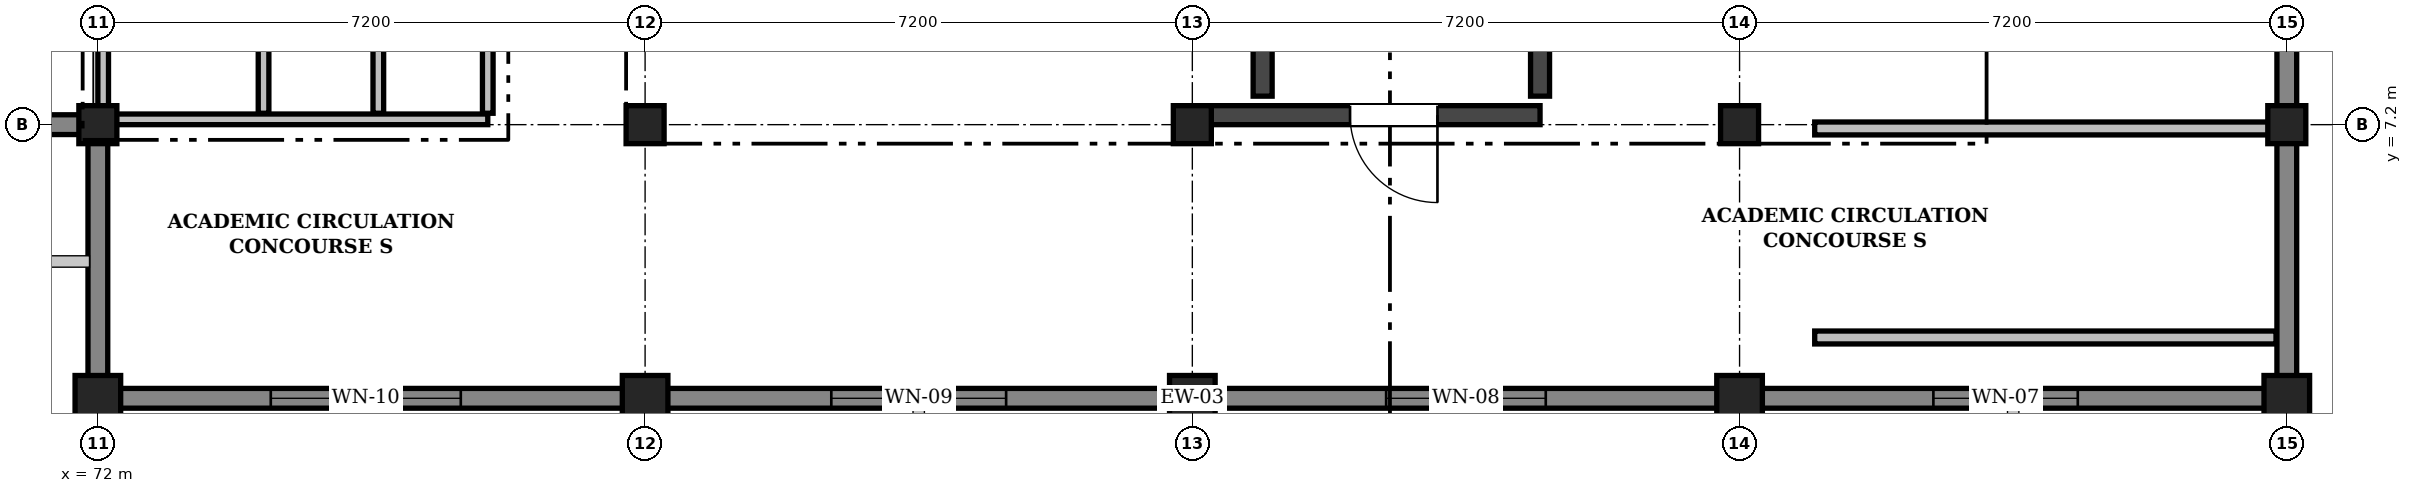
"""IFC4 building model, lengths in metres.
Left out: names, types, materials, properties, quantities, classifications, styles, units other than length and angle.
Written with IfcOpenShell. Run it as: python <this file> out.ifc"""

import sys

from ifc_helpers import new_model, si_unit, direction, frame, frame_2d, origin, origin_2d, place, context, subcontext, project, spatial, rectangle, extrude, element, fill, save


model = new_model("IFC4")
c1 = context("Model", 3, precision=1e-05, world=origin(), true_north=direction((0.0, 1.0)))
c2 = subcontext(c1, "Body", "Model", "MODEL_VIEW")
j1 = project(units=[si_unit("LENGTHUNIT", "METRE"), si_unit("PLANEANGLEUNIT", "RADIAN")], contexts=[c1])
p1 = place(None, origin())
s1 = spatial("IfcSite", under=j1, at=p1, CompositionType="ELEMENT")
p2 = place(p1, origin())
s2 = spatial("IfcBuilding", under=s1, at=p2, CompositionType="ELEMENT")
p3 = place(p2, frame((0.0, 0.0, 32.4)))
s3 = spatial("IfcBuildingStorey", under=s2, at=p3, CompositionType="ELEMENT", Elevation=32.4)
p4 = place(p3, frame((72.0, 3.6, 0.0), z_axis=(0.0, 0.0, 1.0), x_axis=(1.0, 0.0, 0.0)))
e1 = element("IfcColumn", 1, at=p4, inside=s3, PredefinedType="COLUMN", context=c2, shape_type="SweptSolid", body=[
    extrude(rectangle(XDim=0.6, YDim=0.6, at=origin_2d()), origin(), (0.0, 0.0, 1.0), 4.5),
])
p5 = place(p3, frame((72.0, 7.2, 0.0), z_axis=(0.0, 0.0, 1.0), x_axis=(1.0, 0.0, 0.0)))
e2 = element("IfcColumn", 2, at=p5, inside=s3, PredefinedType="COLUMN", context=c2, shape_type="SweptSolid", body=[
    extrude(rectangle(XDim=0.5, YDim=0.5, at=origin_2d()), origin(), (0.0, 0.0, 1.0), 4.5),
])
p6 = place(p3, frame((79.2, 3.6, 0.0), z_axis=(0.0, 0.0, 1.0), x_axis=(1.0, 0.0, 0.0)))
e3 = element("IfcColumn", 3, at=p6, inside=s3, PredefinedType="COLUMN", context=c2, shape_type="SweptSolid", body=[
    extrude(rectangle(XDim=0.6, YDim=0.6, at=origin_2d()), origin(), (0.0, 0.0, 1.0), 4.5),
])
p7 = place(p3, frame((79.2, 7.2, 0.0), z_axis=(0.0, 0.0, 1.0), x_axis=(1.0, 0.0, 0.0)))
e4 = element("IfcColumn", 4, at=p7, inside=s3, PredefinedType="COLUMN", context=c2, shape_type="SweptSolid", body=[
    extrude(rectangle(XDim=0.5, YDim=0.5, at=origin_2d()), origin(), (0.0, 0.0, 1.0), 4.5),
])
p8 = place(p3, frame((86.4, 3.6, 0.0), z_axis=(0.0, 0.0, 1.0), x_axis=(1.0, 0.0, 0.0)))
e5 = element("IfcColumn", 5, at=p8, inside=s3, PredefinedType="COLUMN", context=c2, shape_type="SweptSolid", body=[
    extrude(rectangle(XDim=0.6, YDim=0.6, at=origin_2d()), origin(), (0.0, 0.0, 1.0), 4.5),
])
p9 = place(p3, frame((86.4, 7.2, 0.0), z_axis=(0.0, 0.0, 1.0), x_axis=(1.0, 0.0, 0.0)))
e6 = element("IfcColumn", 6, at=p9, inside=s3, PredefinedType="COLUMN", context=c2, shape_type="SweptSolid", body=[
    extrude(rectangle(XDim=0.5, YDim=0.5, at=origin_2d()), origin(), (0.0, 0.0, 1.0), 4.5),
])
p10 = place(p3, frame((93.6, 3.6, 0.0), z_axis=(0.0, 0.0, 1.0), x_axis=(1.0, 0.0, 0.0)))
e7 = element("IfcColumn", 7, at=p10, inside=s3, PredefinedType="COLUMN", context=c2, shape_type="SweptSolid", body=[
    extrude(rectangle(XDim=0.6, YDim=0.6, at=origin_2d()), origin(), (0.0, 0.0, 1.0), 4.5),
])
p11 = place(p3, frame((93.6, 7.2, 0.0), z_axis=(0.0, 0.0, 1.0), x_axis=(1.0, 0.0, 0.0)))
e8 = element("IfcColumn", 8, at=p11, inside=s3, PredefinedType="COLUMN", context=c2, shape_type="SweptSolid", body=[
    extrude(rectangle(XDim=0.5, YDim=0.5, at=origin_2d()), origin(), (0.0, 0.0, 1.0), 4.5),
])
p12 = place(p3, frame((100.8, 3.6, 0.0), z_axis=(0.0, 0.0, 1.0), x_axis=(1.0, 0.0, 0.0)))
e9 = element("IfcColumn", 9, at=p12, inside=s3, PredefinedType="COLUMN", context=c2, shape_type="SweptSolid", body=[
    extrude(rectangle(XDim=0.6, YDim=0.6, at=origin_2d()), origin(), (0.0, 0.0, 1.0), 4.5),
])
p13 = place(p3, frame((100.8, 7.2, 0.0), z_axis=(0.0, 0.0, 1.0), x_axis=(1.0, 0.0, 0.0)))
e10 = element("IfcColumn", 10, at=p13, inside=s3, PredefinedType="COLUMN", context=c2, shape_type="SweptSolid", body=[
    extrude(rectangle(XDim=0.5, YDim=0.5, at=origin_2d()), origin(), (0.0, 0.0, 1.0), 4.5),
])
p14 = place(p3, frame((100.95, 3.6, 0.0), z_axis=(0.0, 0.0, 1.0), x_axis=(-1.0, 0.0, 0.0)))
e11 = element("IfcWall", 11, at=p14, inside=s3, PredefinedType="SOLIDWALL", context=c2, shape_type="SweptSolid", body=[
    extrude(rectangle(XDim=7.35, YDim=0.26, at=frame_2d((3.675, 0.0))), origin(), (0.0, 0.0, 1.0), 4.22),
])
p15 = place(p14, frame((2.9, 0.0, 0.95)))
e12 = element("IfcOpeningElement", 12, at=p15, cuts=e11, PredefinedType="OPENING", context=c2, shape_type="SweptSolid", body=[
    extrude(rectangle(XDim=1.9, YDim=1.3, at=frame_2d((0.95, 0.65))), frame((0.0, 0.142, 0.0), z_axis=(0.0, -1.0, 0.0), x_axis=(1.0, 0.0, 0.0)), (0.0, 0.0, 1.0), 0.284),
])
p16 = place(p3, frame((93.6, 3.6, 0.0), z_axis=(0.0, 0.0, 1.0), x_axis=(-1.0, 0.0, 0.0)))
e13 = element("IfcWall", 13, at=p16, inside=s3, PredefinedType="SOLIDWALL", context=c2, shape_type="SweptSolid", body=[
    extrude(rectangle(XDim=7.2, YDim=0.26, at=frame_2d((3.6, 0.0))), origin(), (0.0, 0.0, 1.0), 4.22),
])
p17 = place(p16, frame((2.55, 0.0, 0.95)))
e14 = element("IfcOpeningElement", 14, at=p17, cuts=e13, PredefinedType="OPENING", context=c2, shape_type="SweptSolid", body=[
    extrude(rectangle(XDim=2.1, YDim=1.3, at=frame_2d((1.05, 0.65))), frame((0.0, 0.142, 0.0), z_axis=(0.0, -1.0, 0.0), x_axis=(1.0, 0.0, 0.0)), (0.0, 0.0, 1.0), 0.284),
])
p18 = place(p3, frame((86.4, 3.6, 0.0), z_axis=(0.0, 0.0, 1.0), x_axis=(-1.0, 0.0, 0.0)))
e15 = element("IfcWall", 15, at=p18, inside=s3, PredefinedType="SOLIDWALL", context=c2, shape_type="SweptSolid", body=[
    extrude(rectangle(XDim=7.2, YDim=0.26, at=frame_2d((3.6, 0.0))), origin(), (0.0, 0.0, 1.0), 4.22),
])
p19 = place(p18, frame((2.45, 0.0, 0.95)))
e16 = element("IfcOpeningElement", 16, at=p19, cuts=e15, PredefinedType="OPENING", context=c2, shape_type="SweptSolid", body=[
    extrude(rectangle(XDim=2.3, YDim=1.3, at=frame_2d((1.15, 0.65))), frame((0.0, 0.142, 0.0), z_axis=(0.0, -1.0, 0.0), x_axis=(1.0, 0.0, 0.0)), (0.0, 0.0, 1.0), 0.284),
])
p20 = place(p3, frame((79.2, 3.6, 0.0), z_axis=(0.0, 0.0, 1.0), x_axis=(-1.0, 0.0, 0.0)))
e17 = element("IfcWall", 17, at=p20, inside=s3, PredefinedType="SOLIDWALL", context=c2, shape_type="SweptSolid", body=[
    extrude(rectangle(XDim=7.35, YDim=0.26, at=frame_2d((3.675, 0.0))), origin(), (0.0, 0.0, 1.0), 4.22),
])
p21 = place(p20, frame((2.425, 0.0, 0.95)))
e18 = element("IfcOpeningElement", 18, at=p21, cuts=e17, PredefinedType="OPENING", context=c2, shape_type="SweptSolid", body=[
    extrude(rectangle(XDim=2.5, YDim=1.3, at=frame_2d((1.25, 0.65))), frame((0.0, 0.142, 0.0), z_axis=(0.0, -1.0, 0.0), x_axis=(1.0, 0.0, 0.0)), (0.0, 0.0, 1.0), 0.284),
])
p22 = place(p3, frame((72.0, 3.752, 0.0), z_axis=(0.0, 0.0, 1.0), x_axis=(0.0, 1.0, 0.0)))
e19 = element("IfcWall", 19, at=p22, inside=s3, PredefinedType="SOLIDWALL", context=c2, shape_type="SweptSolid", body=[
    extrude(rectangle(XDim=3.296, YDim=0.26, at=frame_2d((1.648, 0.0))), origin(), (0.0, 0.0, 1.0), 4.22),
])
p23 = place(p3, frame((72.15, 7.2, 0.0), z_axis=(0.0, 0.0, 1.0), x_axis=(-1.0, 0.0, 0.0)))
e20 = element("IfcWall", 20, at=p23, inside=s3, PredefinedType="SOLIDWALL", context=c2, shape_type="SweptSolid", body=[
    extrude(rectangle(XDim=7.35, YDim=0.26, at=frame_2d((3.675, 0.0))), origin(), (0.0, 0.0, 1.0), 4.22),
])
p24 = place(p23, frame((2.325, 0.0, 0.95)))
e21 = element("IfcOpeningElement", 21, at=p24, cuts=e20, PredefinedType="OPENING", context=c2, shape_type="SweptSolid", body=[
    extrude(rectangle(XDim=2.7, YDim=1.3, at=frame_2d((1.35, 0.65))), frame((0.0, 0.142, 0.0), z_axis=(0.0, -1.0, 0.0), x_axis=(1.0, 0.0, 0.0)), (0.0, 0.0, 1.0), 0.284),
])
p25 = place(p3, frame((100.8, 14.4, 0.0), z_axis=(0.0, 0.0, 1.0), x_axis=(0.0, -1.0, 0.0)))
e22 = element("IfcWall", 22, at=p25, inside=s3, PredefinedType="SOLIDWALL", context=c2, shape_type="SweptSolid", body=[
    extrude(rectangle(XDim=7.2, YDim=0.26, at=frame_2d((3.6, 0.0))), origin(), (0.0, 0.0, 1.0), 4.22),
])
p26 = place(p25, frame((2.875, 0.0, 0.95)))
e23 = element("IfcOpeningElement", 23, at=p26, cuts=e22, PredefinedType="OPENING", context=c2, shape_type="SweptSolid", body=[
    extrude(rectangle(XDim=1.45, YDim=1.8, at=frame_2d((0.725, 0.9))), frame((0.0, 0.142, 0.0), z_axis=(0.0, -1.0, 0.0), x_axis=(1.0, 0.0, 0.0)), (0.0, 0.0, 1.0), 0.284),
])
p27 = place(p3, frame((100.8, 7.2, 0.0), z_axis=(0.0, 0.0, 1.0), x_axis=(0.0, -1.0, 0.0)))
e24 = element("IfcWall", 24, at=p27, inside=s3, PredefinedType="SOLIDWALL", context=c2, shape_type="SweptSolid", body=[
    extrude(rectangle(XDim=3.448, YDim=0.26, at=frame_2d((1.724, 0.0))), origin(), (0.0, 0.0, 1.0), 4.22),
])
p28 = place(p3, frame((86.65, 7.325, 0.0), z_axis=(0.0, 0.0, 1.0), x_axis=(1.0, 0.0, 0.0)))
e25 = element("IfcWall", 25, at=p28, inside=s3, PredefinedType="SHEAR", context=c2, shape_type="SweptSolid", body=[
    extrude(rectangle(XDim=4.325, YDim=0.25, at=frame_2d((2.163, 0.0))), origin(), (0.0, 0.0, 1.0), 4.25),
])
p29 = place(p28, frame((1.825, 0.0, 0.0)))
e26 = element("IfcOpeningElement", 26, at=p29, cuts=e25, PredefinedType="OPENING", context=c2, shape_type="SweptSolid", body=[
    extrude(rectangle(XDim=1.15, YDim=2.15, at=frame_2d((0.575, 1.075))), frame((0.0, 0.137, 0.0), z_axis=(0.0, -1.0, 0.0), x_axis=(1.0, 0.0, 0.0)), (0.0, 0.0, 1.0), 0.274),
])
p30 = place(p3, frame((87.325, 7.575, 0.0), z_axis=(0.0, 0.0, 1.0), x_axis=(0.0, 1.0, 0.0)))
e27 = element("IfcWall", 27, at=p30, inside=s3, PredefinedType="SHEAR", context=c2, shape_type="SweptSolid", body=[
    extrude(rectangle(XDim=2.77, YDim=0.25, at=frame_2d((1.385, 0.0))), origin(), (0.0, 0.0, 1.0), 4.25),
])
p31 = place(p3, frame((90.975, 7.575, 0.0), z_axis=(0.0, 0.0, 1.0), x_axis=(0.0, 1.0, 0.0)))
e28 = element("IfcWall", 28, at=p31, inside=s3, PredefinedType="SHEAR", context=c2, shape_type="SweptSolid", body=[
    extrude(rectangle(XDim=3.225, YDim=0.25, at=frame_2d((1.613, 0.0))), origin(), (0.0, 0.0, 1.0), 4.25),
])
p32 = place(p3, frame((72.07, 7.27, 0.0), z_axis=(0.0, 0.0, 1.0), x_axis=(1.0, 0.0, 0.0)))
e29 = element("IfcWall", 29, at=p32, inside=s3, PredefinedType="PARTITIONING", context=c2, shape_type="SweptSolid", body=[
    extrude(rectangle(XDim=5.06, YDim=0.14, at=frame_2d((2.53, 0.0))), origin(), (0.0, 0.0, 1.0), 3.78),
])
p33 = place(p3, frame((72.07, 7.35, 0.0), z_axis=(0.0, 0.0, 1.0), x_axis=(0.0, 1.0, 0.0)))
e30 = element("IfcWall", 30, at=p33, inside=s3, PredefinedType="PARTITIONING", context=c2, shape_type="SweptSolid", body=[
    extrude(rectangle(XDim=6.9, YDim=0.14, at=frame_2d((3.45, 0.0))), origin(), (0.0, 0.0, 1.0), 3.78),
])
p34 = place(p3, frame((77.13, 7.35, 0.0), z_axis=(0.0, 0.0, 1.0), x_axis=(0.0, 1.0, 0.0)))
e31 = element("IfcWall", 31, at=p34, inside=s3, PredefinedType="PARTITIONING", context=c2, shape_type="SweptSolid", body=[
    extrude(rectangle(XDim=6.9, YDim=0.14, at=frame_2d((3.45, 0.0))), origin(), (0.0, 0.0, 1.0), 4.16),
])
p35 = place(p3, frame((74.18, 7.35, 0.0), z_axis=(0.0, 0.0, 1.0), x_axis=(0.0, 1.0, 0.0)))
e32 = element("IfcWall", 32, at=p35, inside=s3, PredefinedType="PARTITIONING", context=c2, shape_type="SweptSolid", body=[
    extrude(rectangle(XDim=6.9, YDim=0.14, at=frame_2d((3.45, 0.0))), origin(), (0.0, 0.0, 1.0), 4.16),
])
p36 = place(p35, frame((1.45, 0.0, 0.0)))
e33 = element("IfcOpeningElement", 33, at=p36, cuts=e32, PredefinedType="OPENING", context=c2, shape_type="SweptSolid", body=[
    extrude(rectangle(XDim=0.9, YDim=2.08, at=frame_2d((0.45, 1.04))), frame((0.0, 0.082, 0.0), z_axis=(0.0, -1.0, 0.0), x_axis=(1.0, 0.0, 0.0)), (0.0, 0.0, 1.0), 0.164),
])
p37 = place(p3, frame((75.69, 7.35, 0.0), z_axis=(0.0, 0.0, 1.0), x_axis=(0.0, 1.0, 0.0)))
e34 = element("IfcWall", 34, at=p37, inside=s3, PredefinedType="PARTITIONING", context=c2, shape_type="SweptSolid", body=[
    extrude(rectangle(XDim=6.9, YDim=0.14, at=frame_2d((3.45, 0.0))), origin(), (0.0, 0.0, 1.0), 4.16),
])
p38 = place(p3, frame((94.588, 4.4, 0.0), z_axis=(0.0, 0.0, 1.0), x_axis=(1.0, 0.0, 0.0)))
e35 = element("IfcWall", 35, at=p38, inside=s3, PredefinedType="PARTITIONING", context=c2, shape_type="SweptSolid", body=[
    extrude(rectangle(XDim=6.07, YDim=0.17, at=frame_2d((3.035, 0.0))), origin(), (0.0, 0.0, 1.0), 4.16),
])
p39 = place(p3, frame((94.588, 7.15, 0.0), z_axis=(0.0, 0.0, 1.0), x_axis=(1.0, 0.0, 0.0)))
e36 = element("IfcWall", 36, at=p39, inside=s3, PredefinedType="PARTITIONING", context=c2, shape_type="SweptSolid", body=[
    extrude(rectangle(XDim=6.07, YDim=0.17, at=frame_2d((3.035, 0.0))), origin(), (0.0, 0.0, 1.0), 3.78),
])
p40 = place(p15, origin())
e37 = element("IfcWindow", 37, at=p40, inside=s3, PartitioningType="SINGLE_PANEL", PredefinedType="WINDOW", context=c2, shape_type="SweptSolid", body=[
    extrude(rectangle(XDim=1.9, YDim=1.3, at=frame_2d((0.95, 0.65))), frame((0.0, 0.03, 0.0), z_axis=(0.0, -1.0, 0.0), x_axis=(1.0, 0.0, 0.0)), (0.0, 0.0, 1.0), 0.06),
])
fill(e12, e37)
p41 = place(p17, origin())
e38 = element("IfcWindow", 38, at=p41, inside=s3, PartitioningType="SINGLE_PANEL", PredefinedType="WINDOW", context=c2, shape_type="SweptSolid", body=[
    extrude(rectangle(XDim=2.1, YDim=1.3, at=frame_2d((1.05, 0.65))), frame((0.0, 0.03, 0.0), z_axis=(0.0, -1.0, 0.0), x_axis=(1.0, 0.0, 0.0)), (0.0, 0.0, 1.0), 0.06),
])
fill(e14, e38)
p42 = place(p19, origin())
e39 = element("IfcWindow", 39, at=p42, inside=s3, PartitioningType="SINGLE_PANEL", PredefinedType="WINDOW", context=c2, shape_type="SweptSolid", body=[
    extrude(rectangle(XDim=2.3, YDim=1.3, at=frame_2d((1.15, 0.65))), frame((0.0, 0.03, 0.0), z_axis=(0.0, -1.0, 0.0), x_axis=(1.0, 0.0, 0.0)), (0.0, 0.0, 1.0), 0.06),
])
fill(e16, e39)
p43 = place(p21, origin())
e40 = element("IfcWindow", 40, at=p43, inside=s3, PartitioningType="SINGLE_PANEL", PredefinedType="WINDOW", context=c2, shape_type="SweptSolid", body=[
    extrude(rectangle(XDim=2.5, YDim=1.3, at=frame_2d((1.25, 0.65))), frame((0.0, 0.03, 0.0), z_axis=(0.0, -1.0, 0.0), x_axis=(1.0, 0.0, 0.0)), (0.0, 0.0, 1.0), 0.06),
])
fill(e18, e40)
p44 = place(p29, frame((1.15, 0.0, 0.0), z_axis=(0.0, 0.0, 1.0), x_axis=(-1.0, 0.0, 0.0)))
e41 = element("IfcDoor", 41, at=p44, inside=s3, OperationType="SINGLE_SWING_LEFT", PredefinedType="DOOR", context=c2, shape_type="SweptSolid", body=[
    extrude(rectangle(XDim=1.15, YDim=2.15, at=frame_2d((0.575, 1.075))), frame((0.0, 0.025, 0.0), z_axis=(0.0, -1.0, 0.0), x_axis=(1.0, 0.0, 0.0)), (0.0, 0.0, 1.0), 0.05),
])
fill(e26, e41)
save(model, sys.argv[1])
